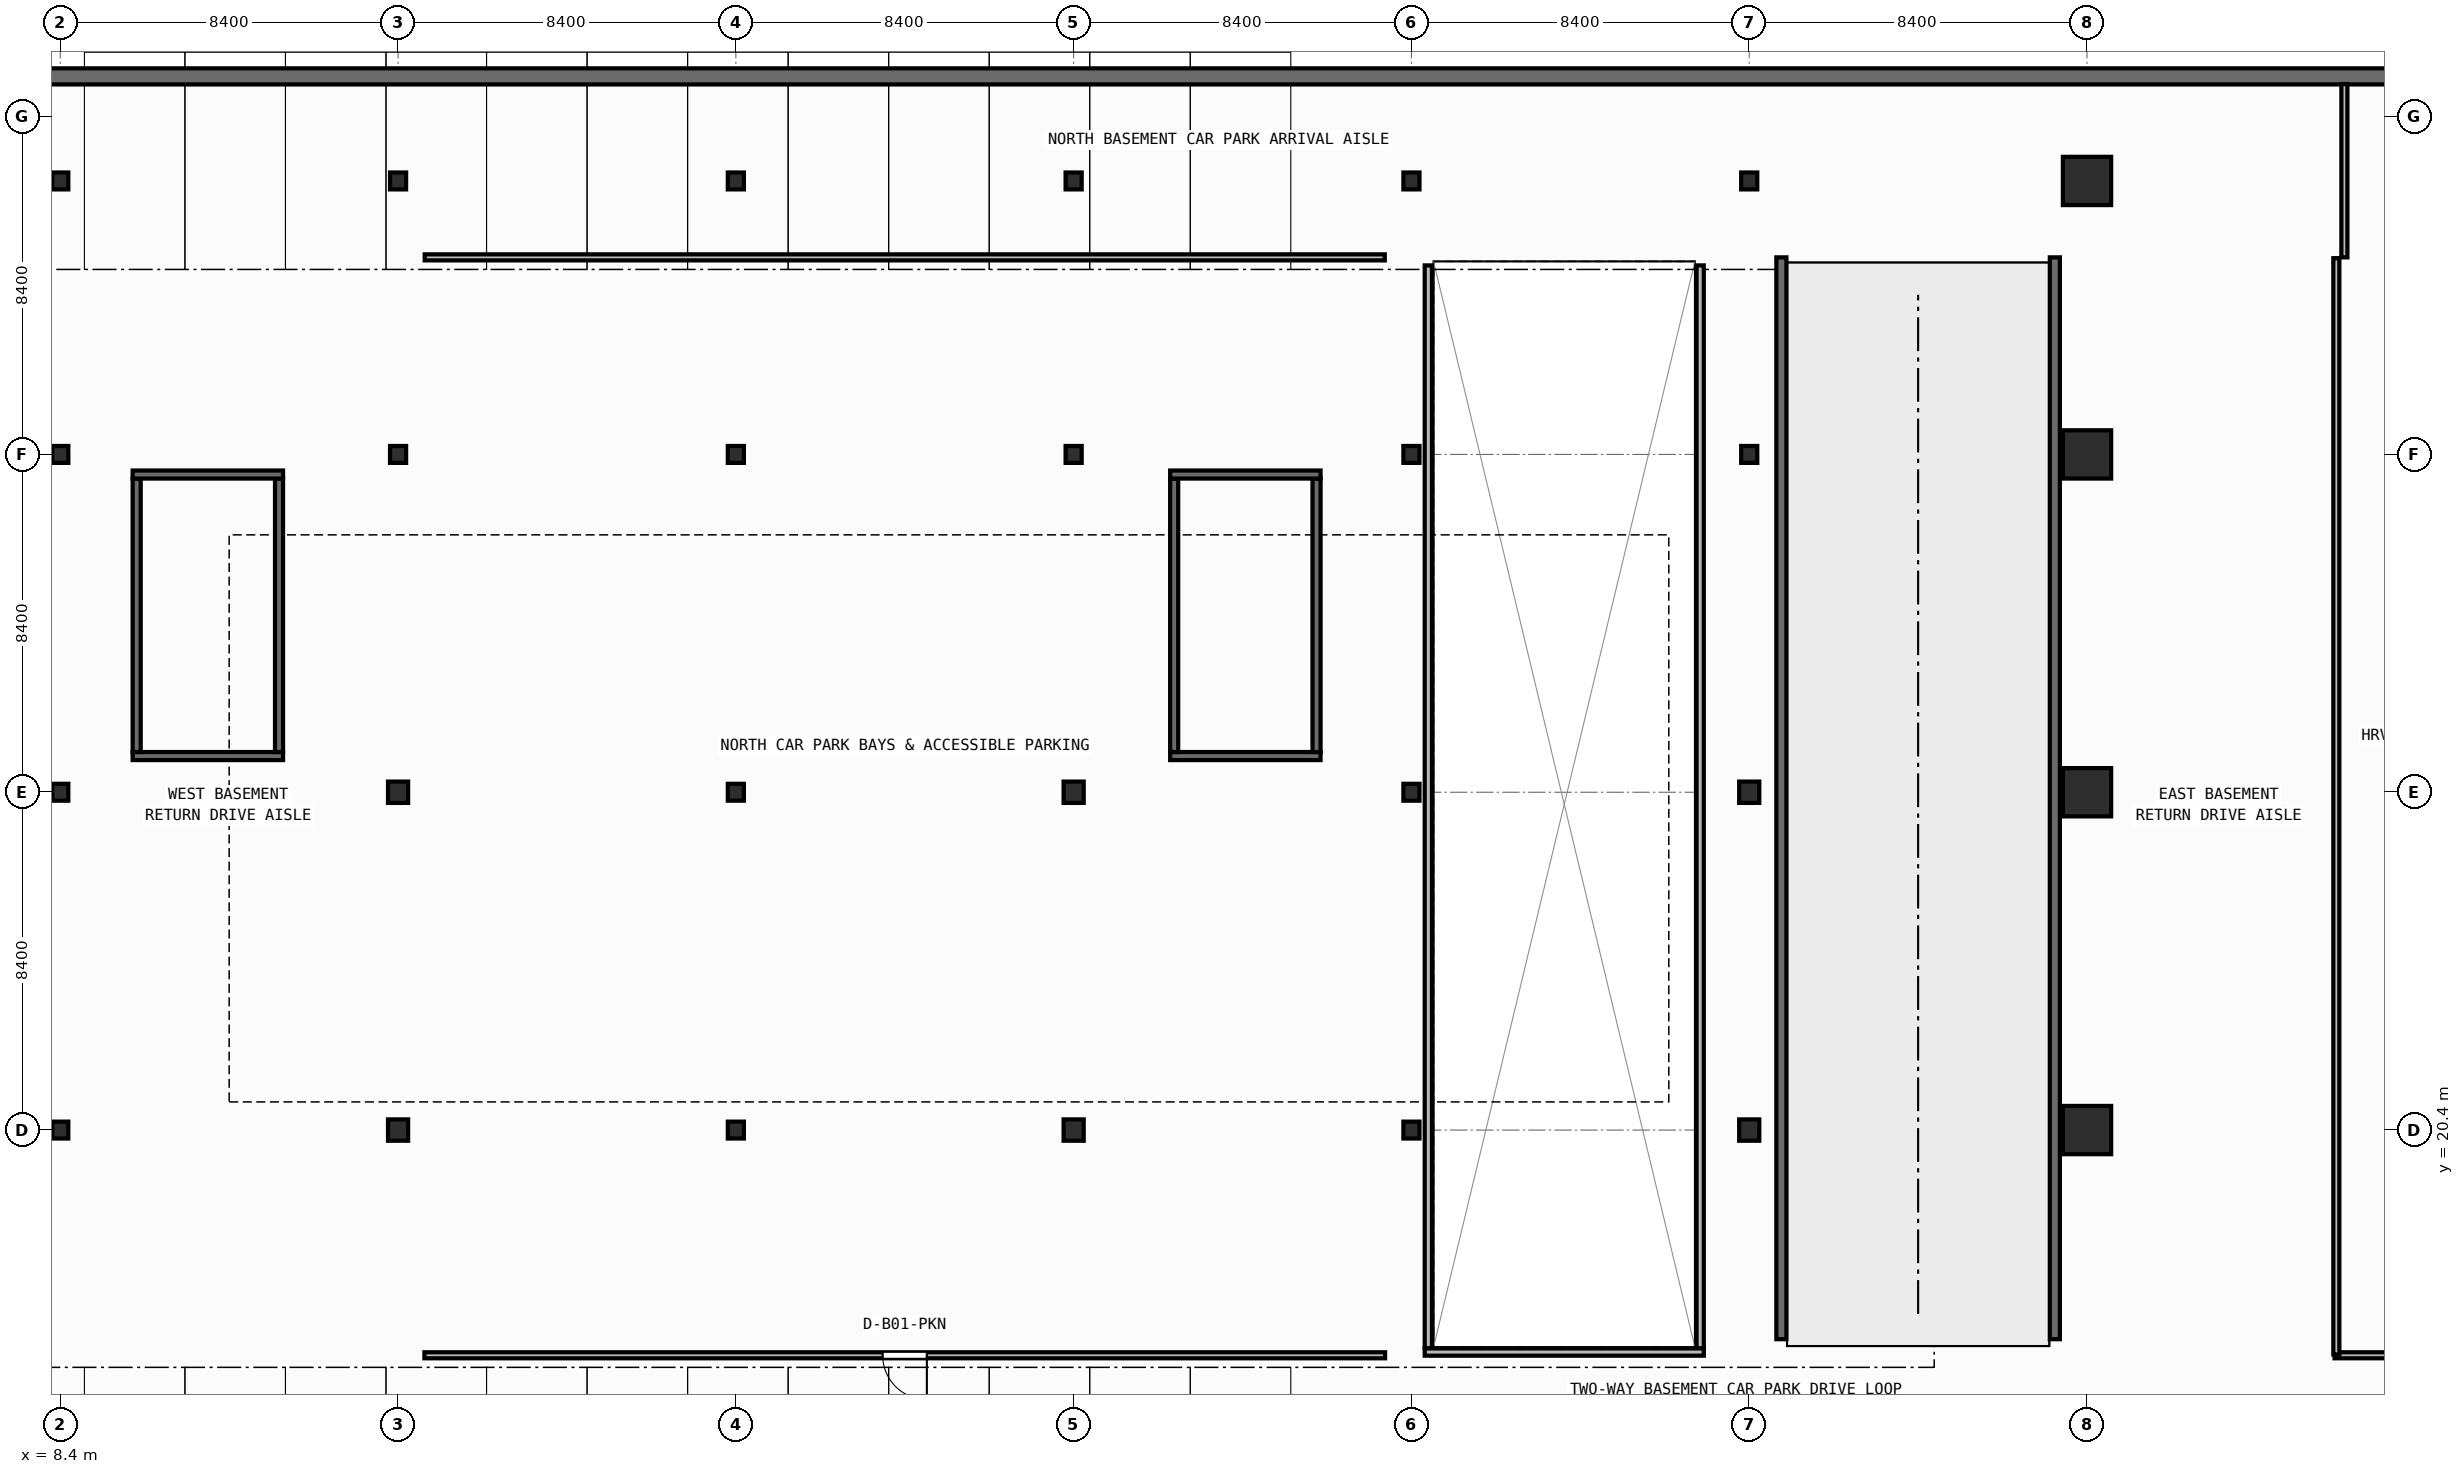
"""IFC4 building model, lengths in metres.
Left out: names, types, materials, properties, quantities, classifications, styles, units other than length and angle.
Written with IfcOpenShell. Run it as: python <this file> out.ifc"""

import sys

from ifc_helpers import new_model, si_unit, direction, frame, frame_2d, origin, origin_2d, place, context, subcontext, project, spatial, rectangle, i_section, extrude, element, fill, save


model = new_model("IFC4")
c1 = context("Model", 3, precision=1e-05, world=origin(), true_north=direction((0.0, 1.0)))
c2 = subcontext(c1, "Body", "Model", "MODEL_VIEW")
j1 = project(units=[si_unit("LENGTHUNIT", "METRE"), si_unit("PLANEANGLEUNIT", "RADIAN")], contexts=[c1])
p1 = place(None, origin())
s1 = spatial("IfcSite", under=j1, at=p1, CompositionType="ELEMENT")
p2 = place(p1, origin())
s2 = spatial("IfcBuilding", under=s1, at=p2, CompositionType="ELEMENT")
p3 = place(p2, frame((0.0, 0.0, -4.5)))
s3 = spatial("IfcBuildingStorey", under=s2, at=p3, CompositionType="ELEMENT", Elevation=-4.5)
p4 = place(p3, frame((8.4, 20.4, 0.0), z_axis=(0.0, 0.0, 1.0), x_axis=(1.0, 0.0, 0.0)))
e1 = element("IfcColumn", 1, at=p4, inside=s3, PredefinedType="COLUMN", context=c2, shape_type="SweptSolid", body=[
    extrude(i_section(OverallWidth=0.4, OverallDepth=0.42, WebThickness=0.025, FlangeThickness=0.04, at=origin_2d()), origin(), (0.0, 0.0, 1.0), 4.5),
])
p5 = place(p3, frame((16.8, 20.4, 0.0), z_axis=(0.0, 0.0, 1.0), x_axis=(1.0, 0.0, 0.0)))
e2 = element("IfcColumn", 2, at=p5, inside=s3, PredefinedType="COLUMN", context=c2, shape_type="SweptSolid", body=[
    extrude(i_section(OverallWidth=0.5, OverallDepth=0.53, WebThickness=0.028, FlangeThickness=0.045, at=origin_2d()), origin(), (0.0, 0.0, 1.0), 4.5),
])
p6 = place(p3, frame((25.2, 20.4, 0.0), z_axis=(0.0, 0.0, 1.0), x_axis=(1.0, 0.0, 0.0)))
e3 = element("IfcColumn", 3, at=p6, inside=s3, PredefinedType="COLUMN", context=c2, shape_type="SweptSolid", body=[
    extrude(i_section(OverallWidth=0.4, OverallDepth=0.42, WebThickness=0.025, FlangeThickness=0.04, at=origin_2d()), origin(), (0.0, 0.0, 1.0), 4.5),
])
p7 = place(p3, frame((33.6, 20.4, 0.0), z_axis=(0.0, 0.0, 1.0), x_axis=(1.0, 0.0, 0.0)))
e4 = element("IfcColumn", 4, at=p7, inside=s3, PredefinedType="COLUMN", context=c2, shape_type="SweptSolid", body=[
    extrude(i_section(OverallWidth=0.5, OverallDepth=0.53, WebThickness=0.028, FlangeThickness=0.045, at=origin_2d()), origin(), (0.0, 0.0, 1.0), 4.5),
])
p8 = place(p3, frame((42.0, 20.4, 0.0), z_axis=(0.0, 0.0, 1.0), x_axis=(1.0, 0.0, 0.0)))
e5 = element("IfcColumn", 5, at=p8, inside=s3, PredefinedType="COLUMN", context=c2, shape_type="SweptSolid", body=[
    extrude(i_section(OverallWidth=0.4, OverallDepth=0.42, WebThickness=0.025, FlangeThickness=0.04, at=origin_2d()), origin(), (0.0, 0.0, 1.0), 4.5),
])
p9 = place(p3, frame((50.4, 20.4, 0.0), z_axis=(0.0, 0.0, 1.0), x_axis=(1.0, 0.0, 0.0)))
e6 = element("IfcColumn", 6, at=p9, inside=s3, PredefinedType="COLUMN", context=c2, shape_type="SweptSolid", body=[
    extrude(i_section(OverallWidth=0.5, OverallDepth=0.53, WebThickness=0.028, FlangeThickness=0.045, at=origin_2d()), origin(), (0.0, 0.0, 1.0), 4.5),
])
p10 = place(p3, frame((58.8, 20.4, 0.0), z_axis=(0.0, 0.0, 1.0), x_axis=(1.0, 0.0, 0.0)))
e7 = element("IfcColumn", 7, at=p10, inside=s3, PredefinedType="COLUMN", context=c2, shape_type="SweptSolid", body=[
    extrude(rectangle(XDim=1.2, YDim=1.2, at=origin_2d()), origin(), (0.0, 0.0, 1.0), 4.5),
])
p11 = place(p3, frame((8.4, 28.8, 0.0), z_axis=(0.0, 0.0, 1.0), x_axis=(1.0, 0.0, 0.0)))
e8 = element("IfcColumn", 8, at=p11, inside=s3, PredefinedType="COLUMN", context=c2, shape_type="SweptSolid", body=[
    extrude(i_section(OverallWidth=0.4, OverallDepth=0.42, WebThickness=0.025, FlangeThickness=0.04, at=origin_2d()), origin(), (0.0, 0.0, 1.0), 4.5),
])
p12 = place(p3, frame((16.8, 28.8, 0.0), z_axis=(0.0, 0.0, 1.0), x_axis=(1.0, 0.0, 0.0)))
e9 = element("IfcColumn", 9, at=p12, inside=s3, PredefinedType="COLUMN", context=c2, shape_type="SweptSolid", body=[
    extrude(i_section(OverallWidth=0.5, OverallDepth=0.53, WebThickness=0.028, FlangeThickness=0.045, at=origin_2d()), origin(), (0.0, 0.0, 1.0), 4.5),
])
p13 = place(p3, frame((25.2, 28.8, 0.0), z_axis=(0.0, 0.0, 1.0), x_axis=(1.0, 0.0, 0.0)))
e10 = element("IfcColumn", 10, at=p13, inside=s3, PredefinedType="COLUMN", context=c2, shape_type="SweptSolid", body=[
    extrude(i_section(OverallWidth=0.4, OverallDepth=0.42, WebThickness=0.025, FlangeThickness=0.04, at=origin_2d()), origin(), (0.0, 0.0, 1.0), 4.5),
])
p14 = place(p3, frame((33.6, 28.8, 0.0), z_axis=(0.0, 0.0, 1.0), x_axis=(1.0, 0.0, 0.0)))
e11 = element("IfcColumn", 11, at=p14, inside=s3, PredefinedType="COLUMN", context=c2, shape_type="SweptSolid", body=[
    extrude(i_section(OverallWidth=0.5, OverallDepth=0.53, WebThickness=0.028, FlangeThickness=0.045, at=origin_2d()), origin(), (0.0, 0.0, 1.0), 4.5),
])
p15 = place(p3, frame((42.0, 28.8, 0.0), z_axis=(0.0, 0.0, 1.0), x_axis=(1.0, 0.0, 0.0)))
e12 = element("IfcColumn", 12, at=p15, inside=s3, PredefinedType="COLUMN", context=c2, shape_type="SweptSolid", body=[
    extrude(i_section(OverallWidth=0.4, OverallDepth=0.42, WebThickness=0.025, FlangeThickness=0.04, at=origin_2d()), origin(), (0.0, 0.0, 1.0), 4.5),
])
p16 = place(p3, frame((50.4, 28.8, 0.0), z_axis=(0.0, 0.0, 1.0), x_axis=(1.0, 0.0, 0.0)))
e13 = element("IfcColumn", 13, at=p16, inside=s3, PredefinedType="COLUMN", context=c2, shape_type="SweptSolid", body=[
    extrude(i_section(OverallWidth=0.5, OverallDepth=0.53, WebThickness=0.028, FlangeThickness=0.045, at=origin_2d()), origin(), (0.0, 0.0, 1.0), 4.5),
])
p17 = place(p3, frame((58.8, 28.8, 0.0), z_axis=(0.0, 0.0, 1.0), x_axis=(1.0, 0.0, 0.0)))
e14 = element("IfcColumn", 14, at=p17, inside=s3, PredefinedType="COLUMN", context=c2, shape_type="SweptSolid", body=[
    extrude(rectangle(XDim=1.2, YDim=1.2, at=origin_2d()), origin(), (0.0, 0.0, 1.0), 4.5),
])
for number, where, z_axis, x_axis in (
    (15, (8.4, 37.2, 0.0), (0.0, 0.0, 1.0), (1.0, 0.0, 0.0)),
    (16, (16.8, 37.2, 0.0), (0.0, 0.0, 1.0), (1.0, 0.0, 0.0)),
    (17, (25.2, 37.2, 0.0), (0.0, 0.0, 1.0), (1.0, 0.0, 0.0)),
    (18, (33.6, 37.2, 0.0), (0.0, 0.0, 1.0), (1.0, 0.0, 0.0)),
    (19, (42.0, 37.2, 0.0), (0.0, 0.0, 1.0), (1.0, 0.0, 0.0)),
    (20, (50.4, 37.2, 0.0), (0.0, 0.0, 1.0), (1.0, 0.0, 0.0)),
):
    element("IfcColumn", number, at=place(p3, frame(where, z_axis=z_axis, x_axis=x_axis)), inside=s3, PredefinedType="COLUMN", context=c2, shape_type="SweptSolid", body=[
        extrude(i_section(OverallWidth=0.4, OverallDepth=0.42, WebThickness=0.025, FlangeThickness=0.04, at=origin_2d()), origin(), (0.0, 0.0, 1.0), 4.5),
    ])
p18 = place(p3, frame((58.8, 37.2, 0.0), z_axis=(0.0, 0.0, 1.0), x_axis=(1.0, 0.0, 0.0)))
e21 = element("IfcColumn", 21, at=p18, inside=s3, PredefinedType="COLUMN", context=c2, shape_type="SweptSolid", body=[
    extrude(rectangle(XDim=1.2, YDim=1.2, at=origin_2d()), origin(), (0.0, 0.0, 1.0), 4.5),
])
for number, where, z_axis, x_axis in (
    (22, (8.4, 44.0, 0.0), (0.0, 0.0, 1.0), (1.0, 0.0, 0.0)),
    (23, (16.8, 44.0, 0.0), (0.0, 0.0, 1.0), (1.0, 0.0, 0.0)),
    (24, (25.2, 44.0, 0.0), (0.0, 0.0, 1.0), (1.0, 0.0, 0.0)),
    (25, (33.6, 44.0, 0.0), (0.0, 0.0, 1.0), (1.0, 0.0, 0.0)),
    (26, (42.0, 44.0, 0.0), (0.0, 0.0, 1.0), (1.0, 0.0, 0.0)),
    (27, (50.4, 44.0, 0.0), (0.0, 0.0, 1.0), (1.0, 0.0, 0.0)),
):
    element("IfcColumn", number, at=place(p3, frame(where, z_axis=z_axis, x_axis=x_axis)), inside=s3, PredefinedType="COLUMN", context=c2, shape_type="SweptSolid", body=[
        extrude(i_section(OverallWidth=0.4, OverallDepth=0.42, WebThickness=0.025, FlangeThickness=0.04, at=origin_2d()), origin(), (0.0, 0.0, 1.0), 4.5),
    ])
p19 = place(p3, frame((58.8, 44.0, 0.0), z_axis=(0.0, 0.0, 1.0), x_axis=(1.0, 0.0, 0.0)))
e28 = element("IfcColumn", 28, at=p19, inside=s3, PredefinedType="COLUMN", context=c2, shape_type="SweptSolid", body=[
    extrude(rectangle(XDim=1.2, YDim=1.2, at=origin_2d()), origin(), (0.0, 0.0, 1.0), 4.5),
])
p20 = place(p3, frame((85.4, 46.6, 0.0), z_axis=(0.0, 0.0, 1.0), x_axis=(-1.0, 0.0, 0.0)))
e29 = element("IfcWall", 29, at=p20, inside=s3, PredefinedType="STANDARD", context=c2, shape_type="SweptSolid", body=[
    extrude(rectangle(XDim=85.4, YDim=0.4, at=frame_2d((42.7, 0.0))), origin(), (0.0, 0.0, 1.0), 4.25),
])
p21 = place(p3, frame((10.2, 29.7, 0.0), z_axis=(0.0, 0.0, 1.0), x_axis=(1.0, 0.0, 0.0)))
e30 = element("IfcWall", 30, at=p21, inside=s3, PredefinedType="SHEAR", context=c2, shape_type="SweptSolid", body=[
    extrude(rectangle(XDim=3.74, YDim=0.2, at=frame_2d((1.87, 0.0))), origin(), (0.0, 0.0, 1.0), 4.25),
])
for number, where, z_axis, x_axis in (
    (31, (10.3, 29.8, 0.0), (0.0, 0.0, 1.0), (0.0, 1.0, 0.0)),
    (32, (13.84, 29.8, 0.0), (0.0, 0.0, 1.0), (0.0, 1.0, 0.0)),
):
    element("IfcWall", number, at=place(p3, frame(where, z_axis=z_axis, x_axis=x_axis)), inside=s3, PredefinedType="SHEAR", context=c2, shape_type="SweptSolid", body=[
        extrude(rectangle(XDim=6.8, YDim=0.2, at=frame_2d((3.4, 0.0))), origin(), (0.0, 0.0, 1.0), 4.25),
    ])
for number, where, z_axis, x_axis in (
    (33, (10.2, 36.7, 0.0), (0.0, 0.0, 1.0), (1.0, 0.0, 0.0)),
    (34, (36.0, 29.7, 0.0), (0.0, 0.0, 1.0), (1.0, 0.0, 0.0)),
):
    element("IfcWall", number, at=place(p3, frame(where, z_axis=z_axis, x_axis=x_axis)), inside=s3, PredefinedType="SHEAR", context=c2, shape_type="SweptSolid", body=[
        extrude(rectangle(XDim=3.74, YDim=0.2, at=frame_2d((1.87, 0.0))), origin(), (0.0, 0.0, 1.0), 4.25),
    ])
for number, where, z_axis, x_axis in (
    (35, (36.1, 29.8, 0.0), (0.0, 0.0, 1.0), (0.0, 1.0, 0.0)),
    (36, (39.64, 29.8, 0.0), (0.0, 0.0, 1.0), (0.0, 1.0, 0.0)),
):
    element("IfcWall", number, at=place(p3, frame(where, z_axis=z_axis, x_axis=x_axis)), inside=s3, PredefinedType="SHEAR", context=c2, shape_type="SweptSolid", body=[
        extrude(rectangle(XDim=6.8, YDim=0.2, at=frame_2d((3.4, 0.0))), origin(), (0.0, 0.0, 1.0), 4.25),
    ])
p22 = place(p3, frame((36.0, 36.7, 0.0), z_axis=(0.0, 0.0, 1.0), x_axis=(1.0, 0.0, 0.0)))
e37 = element("IfcWall", 37, at=p22, inside=s3, PredefinedType="SHEAR", context=c2, shape_type="SweptSolid", body=[
    extrude(rectangle(XDim=3.74, YDim=0.2, at=frame_2d((1.87, 0.0))), origin(), (0.0, 0.0, 1.0), 4.25),
])
p23 = place(p3, frame((42.42, 14.97, 0.0), z_axis=(0.0, 0.0, 1.0), x_axis=(0.0, 1.0, 0.0)))
e38 = element("IfcWall", 38, at=p23, inside=s3, PredefinedType="PARTITIONING", context=c2, shape_type="SweptSolid", body=[
    extrude(rectangle(XDim=26.93, YDim=0.18, at=frame_2d((13.465, 0.0))), origin(), (0.0, 0.0, 1.0), 3.623),
])
p24 = place(p3, frame((49.18, 14.97, 0.0), z_axis=(0.0, 0.0, 1.0), x_axis=(0.0, 1.0, 0.0)))
e39 = element("IfcWall", 39, at=p24, inside=s3, PredefinedType="PARTITIONING", context=c2, shape_type="SweptSolid", body=[
    extrude(rectangle(XDim=26.93, YDim=0.18, at=frame_2d((13.465, 0.0))), origin(), (0.0, 0.0, 1.0), 4.25),
])
p25 = place(p3, frame((42.33, 14.88, 0.0), z_axis=(0.0, 0.0, 1.0), x_axis=(1.0, 0.0, 0.0)))
e40 = element("IfcWall", 40, at=p25, inside=s3, PredefinedType="PARTITIONING", context=c2, shape_type="SweptSolid", body=[
    extrude(rectangle(XDim=6.94, YDim=0.18, at=frame_2d((3.47, 0.0))), origin(), (0.0, 0.0, 1.0), 4.25),
])
for number, where, z_axis, x_axis in (
    (41, (51.2, 15.2, 0.0), (0.0, 0.0, 1.0), (0.0, 1.0, 0.0)),
    (42, (58.0, 15.2, 0.0), (0.0, 0.0, 1.0), (0.0, 1.0, 0.0)),
):
    element("IfcWall", number, at=place(p3, frame(where, z_axis=z_axis, x_axis=x_axis)), inside=s3, PredefinedType="SHEAR", context=c2, shape_type="SweptSolid", body=[
        extrude(rectangle(XDim=26.9, YDim=0.25, at=frame_2d((13.45, 0.0))), origin(), (0.0, 0.0, 1.0), 4.25),
    ])
p26 = place(p3, frame((41.344, 14.8, 0.0), z_axis=(0.0, 0.0, 1.0), x_axis=(-1.0, 0.0, 0.0)))
e43 = element("IfcWall", 43, at=p26, inside=s3, PredefinedType="PARTITIONING", context=c2, shape_type="SweptSolid", body=[
    extrude(rectangle(XDim=23.889, YDim=0.15, at=frame_2d((11.945, 0.0))), origin(), (0.0, 0.0, 1.0), 4.25),
])
p27 = place(p26, frame((11.395, 0.0, 0.0)))
e44 = element("IfcOpeningElement", 44, at=p27, cuts=e43, PredefinedType="OPENING", context=c2, shape_type="SweptSolid", body=[
    extrude(rectangle(XDim=1.1, YDim=2.1, at=frame_2d((0.55, 1.05))), frame((0.0, 0.085, 0.0), z_axis=(0.0, -1.0, 0.0), x_axis=(1.0, 0.0, 0.0)), (0.0, 0.0, 1.0), 0.17),
])
p28 = place(p3, frame((74.995, 14.8, 0.0), z_axis=(0.0, 0.0, 1.0), x_axis=(-1.0, 0.0, 0.0)))
e45 = element("IfcWall", 45, at=p28, inside=s3, PredefinedType="PARTITIONING", context=c2, shape_type="SweptSolid", body=[
    extrude(rectangle(XDim=10.039, YDim=0.15, at=frame_2d((5.02, 0.0))), origin(), (0.0, 0.0, 1.0), 4.25),
])
p29 = place(p28, frame((4.32, 0.0, 0.0)))
e46 = element("IfcOpeningElement", 46, at=p29, cuts=e45, PredefinedType="OPENING", context=c2, shape_type="SweptSolid", body=[
    extrude(rectangle(XDim=1.4, YDim=2.15, at=frame_2d((0.7, 1.075))), frame((0.0, 0.085, 0.0), z_axis=(0.0, -1.0, 0.0), x_axis=(1.0, 0.0, 0.0)), (0.0, 0.0, 1.0), 0.17),
])
p30 = place(p3, frame((17.463, 42.1, 0.0), z_axis=(0.0, 0.0, 1.0), x_axis=(1.0, 0.0, 0.0)))
e47 = element("IfcWall", 47, at=p30, inside=s3, PredefinedType="PARTITIONING", context=c2, shape_type="SweptSolid", body=[
    extrude(rectangle(XDim=23.874, YDim=0.15, at=frame_2d((11.937, 0.0))), origin(), (0.0, 0.0, 1.0), 4.25),
])
p31 = place(p3, frame((65.2, 42.1, 0.0), z_axis=(0.0, 0.0, 1.0), x_axis=(0.0, 1.0, 0.0)))
e48 = element("IfcWall", 48, at=p31, inside=s3, PredefinedType="PARTITIONING", context=c2, shape_type="SweptSolid", body=[
    extrude(rectangle(XDim=4.31, YDim=0.15, at=frame_2d((2.155, 0.0))), origin(), (0.0, 0.0, 1.0), 4.25),
])
p32 = place(p3, frame((65.0, 14.82, 0.0), z_axis=(0.0, 0.0, 1.0), x_axis=(0.0, 1.0, 0.0)))
e49 = element("IfcWall", 49, at=p32, inside=s3, PredefinedType="PARTITIONING", context=c2, shape_type="SweptSolid", body=[
    extrude(rectangle(XDim=27.26, YDim=0.15, at=frame_2d((13.63, 0.0))), origin(), (0.0, 0.0, 1.0), 4.25),
])
p33 = place(p27, origin())
e50 = element("IfcDoor", 50, at=p33, inside=s3, OperationType="SINGLE_SWING_LEFT", PredefinedType="DOOR", context=c2, shape_type="SweptSolid", body=[
    extrude(rectangle(XDim=1.1, YDim=2.1, at=frame_2d((0.55, 1.05))), frame((0.0, 0.025, 0.0), z_axis=(0.0, -1.0, 0.0), x_axis=(1.0, 0.0, 0.0)), (0.0, 0.0, 1.0), 0.05),
])
fill(e44, e50)
save(model, sys.argv[1])
